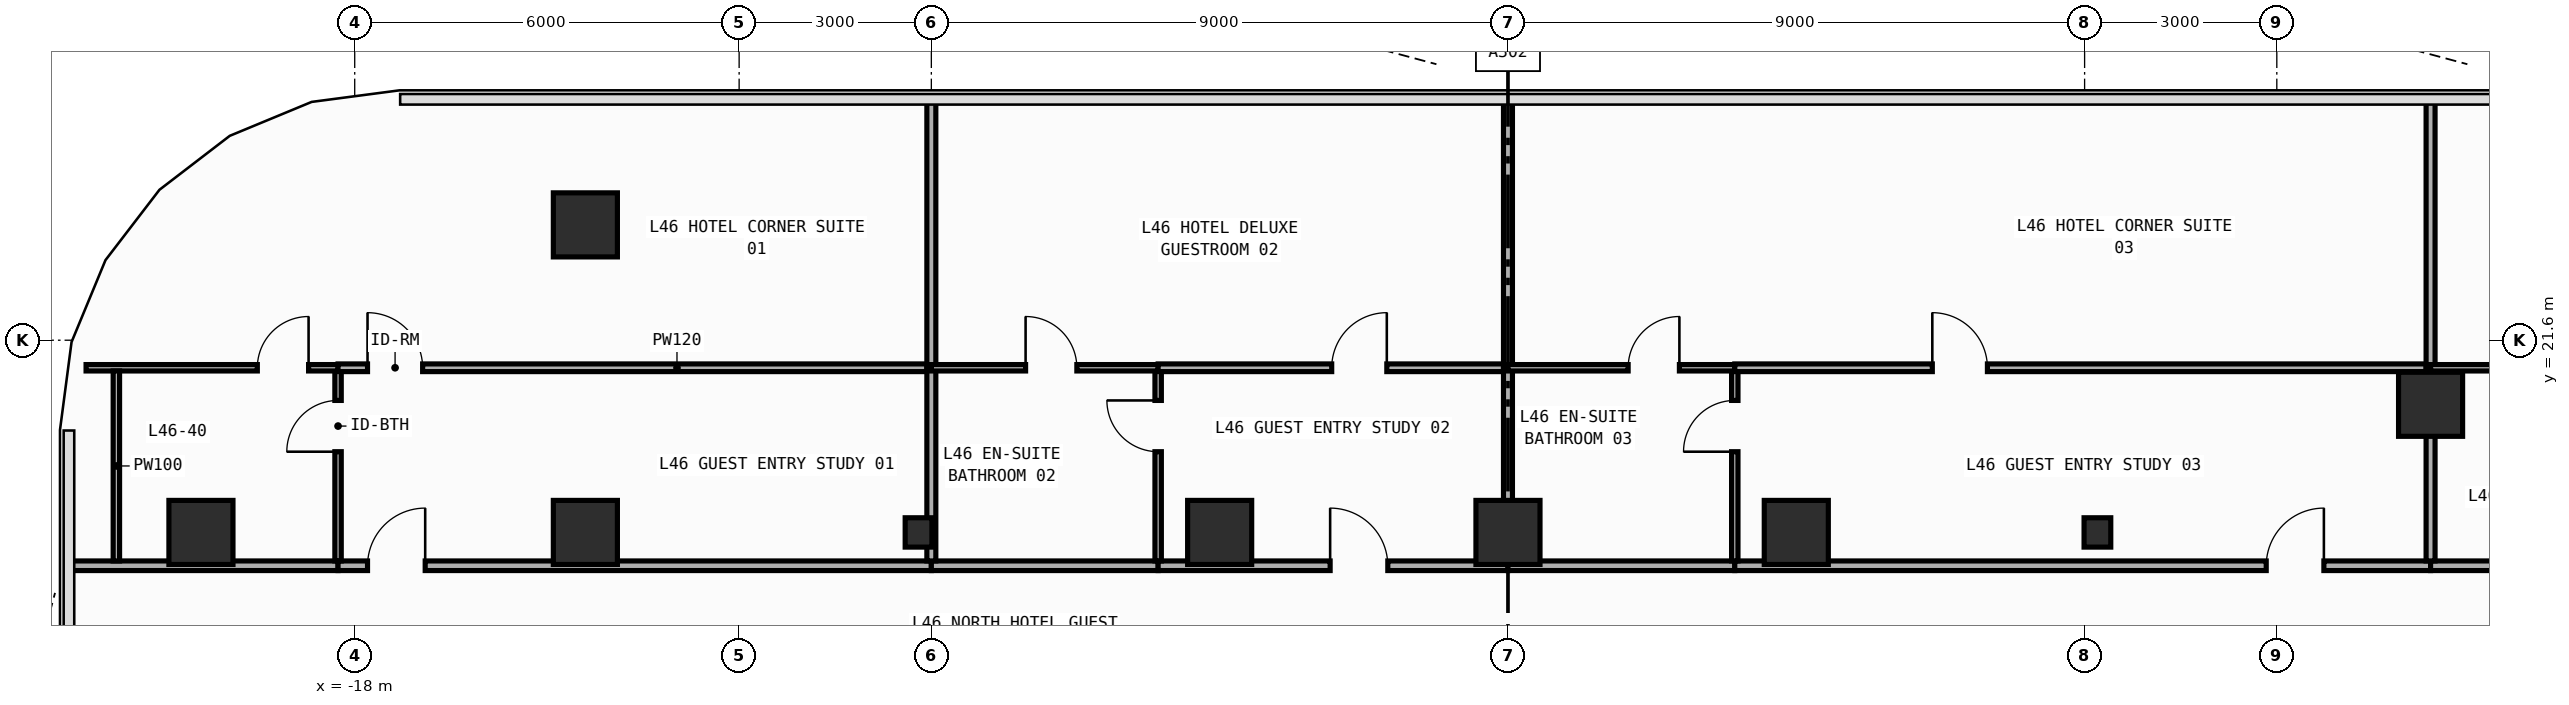
"""IFC4 building model, lengths in metres.
Left out: names, types, materials, properties, quantities, classifications, styles, units other than length and angle.
Written with IfcOpenShell. Run it as: python <this file> out.ifc"""

import sys

from ifc_helpers import new_model, si_unit, direction, frame, frame_2d, origin, origin_2d, place, context, subcontext, project, spatial, rectangle, i_section, extrude, element, fill, save


model = new_model("IFC4")
c1 = context("Model", 3, precision=1e-05, world=origin(), true_north=direction((0.0, 1.0)))
c2 = subcontext(c1, "Body", "Model", "MODEL_VIEW")
j1 = project(units=[si_unit("LENGTHUNIT", "METRE"), si_unit("PLANEANGLEUNIT", "RADIAN")], contexts=[c1])
p1 = place(None, origin())
s1 = spatial("IfcSite", under=j1, at=p1, CompositionType="ELEMENT")
p2 = place(p1, origin())
s2 = spatial("IfcBuilding", under=s1, at=p2, CompositionType="ELEMENT")
p3 = place(p2, frame((0.0, 0.0, 199.2)))
s3 = spatial("IfcBuildingStorey", under=s2, at=p3, CompositionType="ELEMENT", Elevation=199.2)
for number, where, z_axis, x_axis in (
    (1, (-9.2, 18.6, 0.0), (0.0, 0.0, 1.0), (1.0, 0.0, 0.0)),
    (2, (9.2, 18.6, 0.0), (0.0, 0.0, 1.0), (1.0, 0.0, 0.0)),
):
    element("IfcColumn", number, at=place(p3, frame(where, z_axis=z_axis, x_axis=x_axis)), inside=s3, PredefinedType="COLUMN", context=c2, shape_type="SweptSolid", body=[
        extrude(i_section(OverallWidth=0.417, OverallDepth=0.458, WebThickness=0.03, FlangeThickness=0.05, FilletRadius=0.022, at=origin_2d()), origin(), (0.0, 0.0, 1.0), 3.8),
    ])
for number, where, z_axis, x_axis in (
    (3, (-20.4, 18.6, 0.0), (0.0, 0.0, 1.0), (1.0, 0.0, 0.0)),
    (4, (-14.4, 18.6, 0.0), (0.0, 0.0, 1.0), (1.0, 0.0, 0.0)),
    (5, (-4.5, 18.6, 0.0), (0.0, 0.0, 1.0), (1.0, 0.0, 0.0)),
    (6, (0.0, 18.6, 0.0), (0.0, 0.0, 1.0), (1.0, 0.0, 0.0)),
    (7, (4.5, 18.6, 0.0), (0.0, 0.0, 1.0), (1.0, 0.0, 0.0)),
    (8, (-14.4, 23.4, 0.0), (0.0, 0.0, 1.0), (1.0, 0.0, 0.0)),
    (9, (14.4, 20.6, 0.0), (0.0, 0.0, 1.0), (1.0, 0.0, 0.0)),
):
    element("IfcColumn", number, at=place(p3, frame(where, z_axis=z_axis, x_axis=x_axis)), inside=s3, PredefinedType="COLUMN", context=c2, shape_type="SweptSolid", body=[
        extrude(rectangle(XDim=1.0, YDim=1.0, at=origin_2d()), origin(), (0.0, 0.0, 1.0), 3.8),
    ])
p4 = place(p3, frame((-22.455, 18.08, 0.0), z_axis=(0.0, 0.0, 1.0), x_axis=(1.0, 0.0, 0.0)))
e10 = element("IfcWall", 10, at=p4, inside=s3, PredefinedType="PARTITIONING", context=c2, shape_type="SweptSolid", body=[
    extrude(rectangle(XDim=4.195, YDim=0.15, at=frame_2d((2.098, 0.0))), origin(), (0.0, 0.0, 1.0), 3.54),
])
p5 = place(p3, frame((-18.26, 18.08, 0.0), z_axis=(0.0, 0.0, 1.0), x_axis=(1.0, 0.0, 0.0)))
e11 = element("IfcWall", 11, at=p5, inside=s3, PredefinedType="PARTITIONING", context=c2, shape_type="SweptSolid", body=[
    extrude(rectangle(XDim=9.26, YDim=0.15, at=frame_2d((4.63, 0.0))), origin(), (0.0, 0.0, 1.0), 3.54),
])
p6 = place(p5, frame((0.46, 0.0, 0.0)))
e12 = element("IfcOpeningElement", 12, at=p6, cuts=e11, PredefinedType="OPENING", context=c2, shape_type="SweptSolid", body=[
    extrude(rectangle(XDim=0.9, YDim=2.15, at=frame_2d((0.45, 1.075))), frame((0.0, 0.085, 0.0), z_axis=(0.0, -1.0, 0.0), x_axis=(1.0, 0.0, 0.0)), (0.0, 0.0, 1.0), 0.17),
])
p7 = place(p3, frame((-9.0, 18.08, 0.0), z_axis=(0.0, 0.0, 1.0), x_axis=(1.0, 0.0, 0.0)))
e13 = element("IfcWall", 13, at=p7, inside=s3, PredefinedType="PARTITIONING", context=c2, shape_type="SweptSolid", body=[
    extrude(rectangle(XDim=3.54, YDim=0.15, at=frame_2d((1.77, 0.0))), origin(), (0.0, 0.0, 1.0), 3.54),
])
p8 = place(p3, frame((-5.46, 18.08, 0.0), z_axis=(0.0, 0.0, 1.0), x_axis=(1.0, 0.0, 0.0)))
e14 = element("IfcWall", 14, at=p8, inside=s3, PredefinedType="PARTITIONING", context=c2, shape_type="SweptSolid", body=[
    extrude(rectangle(XDim=5.46, YDim=0.15, at=frame_2d((2.73, 0.0))), origin(), (0.0, 0.0, 1.0), 3.54),
])
p9 = place(p8, frame((2.684, 0.0, 0.0)))
e15 = element("IfcOpeningElement", 15, at=p9, cuts=e14, PredefinedType="OPENING", context=c2, shape_type="SweptSolid", body=[
    extrude(rectangle(XDim=0.9, YDim=2.15, at=frame_2d((0.45, 1.075))), frame((0.0, 0.085, 0.0), z_axis=(0.0, -1.0, 0.0), x_axis=(1.0, 0.0, 0.0)), (0.0, 0.0, 1.0), 0.17),
])
p10 = place(p3, frame((0.0, 18.08, 0.0), z_axis=(0.0, 0.0, 1.0), x_axis=(1.0, 0.0, 0.0)))
e16 = element("IfcWall", 16, at=p10, inside=s3, PredefinedType="PARTITIONING", context=c2, shape_type="SweptSolid", body=[
    extrude(rectangle(XDim=3.54, YDim=0.15, at=frame_2d((1.77, 0.0))), origin(), (0.0, 0.0, 1.0), 3.54),
])
p11 = place(p3, frame((3.54, 18.08, 0.0), z_axis=(0.0, 0.0, 1.0), x_axis=(1.0, 0.0, 0.0)))
e17 = element("IfcWall", 17, at=p11, inside=s3, PredefinedType="PARTITIONING", context=c2, shape_type="SweptSolid", body=[
    extrude(rectangle(XDim=10.86, YDim=0.15, at=frame_2d((5.43, 0.0))), origin(), (0.0, 0.0, 1.0), 3.54),
])
p12 = place(p11, frame((8.295, 0.0, 0.0)))
e18 = element("IfcOpeningElement", 18, at=p12, cuts=e17, PredefinedType="OPENING", context=c2, shape_type="SweptSolid", body=[
    extrude(rectangle(XDim=0.9, YDim=2.15, at=frame_2d((0.45, 1.075))), frame((0.0, 0.085, 0.0), z_axis=(0.0, -1.0, 0.0), x_axis=(1.0, 0.0, 0.0)), (0.0, 0.0, 1.0), 0.17),
])
p13 = place(p3, frame((14.4, 18.08, 0.0), z_axis=(0.0, 0.0, 1.0), x_axis=(1.0, 0.0, 0.0)))
e19 = element("IfcWall", 19, at=p13, inside=s3, PredefinedType="PARTITIONING", context=c2, shape_type="SweptSolid", body=[
    extrude(rectangle(XDim=3.036, YDim=0.15, at=frame_2d((1.518, 0.0))), origin(), (0.0, 0.0, 1.0), 3.54),
])
p14 = place(p3, frame((-18.26, 18.155, 0.0), z_axis=(0.0, 0.0, 1.0), x_axis=(0.0, 1.0, 0.0)))
e20 = element("IfcWall", 20, at=p14, inside=s3, PredefinedType="PARTITIONING", context=c2, shape_type="SweptSolid", body=[
    extrude(rectangle(XDim=2.965, YDim=0.1, at=frame_2d((1.482, 0.0))), origin(), (0.0, 0.0, 1.0), 3.54),
])
p15 = place(p14, frame((1.705, 0.0, 0.0)))
e21 = element("IfcOpeningElement", 21, at=p15, cuts=e20, PredefinedType="OPENING", context=c2, shape_type="SweptSolid", body=[
    extrude(rectangle(XDim=0.8, YDim=2.1, at=frame_2d((0.4, 1.05))), frame((0.0, 0.06, 0.0), z_axis=(0.0, -1.0, 0.0), x_axis=(1.0, 0.0, 0.0)), (0.0, 0.0, 1.0), 0.12),
])
p16 = place(p3, frame((-22.193, 21.17, 0.0), z_axis=(0.0, 0.0, 1.0), x_axis=(1.0, 0.0, 0.0)))
e22 = element("IfcWall", 22, at=p16, inside=s3, PredefinedType="PARTITIONING", context=c2, shape_type="SweptSolid", body=[
    extrude(rectangle(XDim=3.933, YDim=0.1, at=frame_2d((1.967, 0.0))), origin(), (0.0, 0.0, 1.0), 3.54),
])
p17 = place(p16, frame((2.673, 0.0, 0.0)))
e23 = element("IfcOpeningElement", 23, at=p17, cuts=e22, PredefinedType="OPENING", context=c2, shape_type="SweptSolid", body=[
    extrude(rectangle(XDim=0.8, YDim=2.1, at=frame_2d((0.4, 1.05))), frame((0.0, 0.06, 0.0), z_axis=(0.0, -1.0, 0.0), x_axis=(1.0, 0.0, 0.0)), (0.0, 0.0, 1.0), 0.12),
])
p18 = place(p3, frame((-18.26, 21.17, 0.0), z_axis=(0.0, 0.0, 1.0), x_axis=(1.0, 0.0, 0.0)))
e24 = element("IfcWall", 24, at=p18, inside=s3, PredefinedType="PARTITIONING", context=c2, shape_type="SweptSolid", body=[
    extrude(rectangle(XDim=9.26, YDim=0.12, at=frame_2d((4.63, 0.0))), origin(), (0.0, 0.0, 1.0), 3.54),
])
p19 = place(p18, frame((0.46, 0.0, 0.0)))
e25 = element("IfcOpeningElement", 25, at=p19, cuts=e24, PredefinedType="OPENING", context=c2, shape_type="SweptSolid", body=[
    extrude(rectangle(XDim=0.86, YDim=2.15, at=frame_2d((0.43, 1.075))), frame((0.0, 0.07, 0.0), z_axis=(0.0, -1.0, 0.0), x_axis=(1.0, 0.0, 0.0)), (0.0, 0.0, 1.0), 0.14),
])
p20 = place(p3, frame((-9.0, 18.155, 0.0), z_axis=(0.0, 0.0, 1.0), x_axis=(0.0, 1.0, 0.0)))
e26 = element("IfcWall", 26, at=p20, inside=s3, PredefinedType="PARTITIONING", context=c2, shape_type="SweptSolid", body=[
    extrude(rectangle(XDim=3.015, YDim=0.14, at=frame_2d((1.507, 0.0))), origin(), (0.0, 0.0, 1.0), 2.952),
])
p21 = place(p3, frame((-9.0, 21.17, 0.0), z_axis=(0.0, 0.0, 1.0), x_axis=(0.0, 1.0, 0.0)))
e27 = element("IfcWall", 27, at=p21, inside=s3, PredefinedType="PARTITIONING", context=c2, shape_type="SweptSolid", body=[
    extrude(rectangle(XDim=4.185, YDim=0.14, at=frame_2d((2.093, 0.0))), origin(), (0.0, 0.0, 1.0), 3.54),
])
p22 = place(p3, frame((-5.46, 18.155, 0.0), z_axis=(0.0, 0.0, 1.0), x_axis=(0.0, 1.0, 0.0)))
e28 = element("IfcWall", 28, at=p22, inside=s3, PredefinedType="PARTITIONING", context=c2, shape_type="SweptSolid", body=[
    extrude(rectangle(XDim=2.965, YDim=0.1, at=frame_2d((1.482, 0.0))), origin(), (0.0, 0.0, 1.0), 3.54),
])
p23 = place(p22, frame((1.705, 0.0, 0.0)))
e29 = element("IfcOpeningElement", 29, at=p23, cuts=e28, PredefinedType="OPENING", context=c2, shape_type="SweptSolid", body=[
    extrude(rectangle(XDim=0.8, YDim=2.1, at=frame_2d((0.4, 1.05))), frame((0.0, 0.06, 0.0), z_axis=(0.0, -1.0, 0.0), x_axis=(1.0, 0.0, 0.0)), (0.0, 0.0, 1.0), 0.12),
])
p24 = place(p3, frame((-9.0, 21.17, 0.0), z_axis=(0.0, 0.0, 1.0), x_axis=(1.0, 0.0, 0.0)))
e30 = element("IfcWall", 30, at=p24, inside=s3, PredefinedType="PARTITIONING", context=c2, shape_type="SweptSolid", body=[
    extrude(rectangle(XDim=3.54, YDim=0.1, at=frame_2d((1.77, 0.0))), origin(), (0.0, 0.0, 1.0), 3.54),
])
p25 = place(p24, frame((1.471, 0.0, 0.0)))
e31 = element("IfcOpeningElement", 31, at=p25, cuts=e30, PredefinedType="OPENING", context=c2, shape_type="SweptSolid", body=[
    extrude(rectangle(XDim=0.8, YDim=2.1, at=frame_2d((0.4, 1.05))), frame((0.0, 0.06, 0.0), z_axis=(0.0, -1.0, 0.0), x_axis=(1.0, 0.0, 0.0)), (0.0, 0.0, 1.0), 0.12),
])
p26 = place(p3, frame((-5.46, 21.17, 0.0), z_axis=(0.0, 0.0, 1.0), x_axis=(1.0, 0.0, 0.0)))
e32 = element("IfcWall", 32, at=p26, inside=s3, PredefinedType="PARTITIONING", context=c2, shape_type="SweptSolid", body=[
    extrude(rectangle(XDim=5.46, YDim=0.12, at=frame_2d((2.73, 0.0))), origin(), (0.0, 0.0, 1.0), 3.54),
])
p27 = place(p26, frame((2.709, 0.0, 0.0)))
e33 = element("IfcOpeningElement", 33, at=p27, cuts=e32, PredefinedType="OPENING", context=c2, shape_type="SweptSolid", body=[
    extrude(rectangle(XDim=0.86, YDim=2.15, at=frame_2d((0.43, 1.075))), frame((0.0, 0.07, 0.0), z_axis=(0.0, -1.0, 0.0), x_axis=(1.0, 0.0, 0.0)), (0.0, 0.0, 1.0), 0.14),
])
p28 = place(p3, frame((0.0, 18.155, 0.0), z_axis=(0.0, 0.0, 1.0), x_axis=(0.0, 1.0, 0.0)))
e34 = element("IfcWall", 34, at=p28, inside=s3, PredefinedType="PARTITIONING", context=c2, shape_type="SweptSolid", body=[
    extrude(rectangle(XDim=3.015, YDim=0.14, at=frame_2d((1.507, 0.0))), origin(), (0.0, 0.0, 1.0), 3.54),
])
p29 = place(p3, frame((0.0, 21.17, 0.0), z_axis=(0.0, 0.0, 1.0), x_axis=(0.0, 1.0, 0.0)))
e35 = element("IfcWall", 35, at=p29, inside=s3, PredefinedType="PARTITIONING", context=c2, shape_type="SweptSolid", body=[
    extrude(rectangle(XDim=4.185, YDim=0.14, at=frame_2d((2.093, 0.0))), origin(), (0.0, 0.0, 1.0), 3.54),
])
p30 = place(p3, frame((3.54, 18.155, 0.0), z_axis=(0.0, 0.0, 1.0), x_axis=(0.0, 1.0, 0.0)))
e36 = element("IfcWall", 36, at=p30, inside=s3, PredefinedType="PARTITIONING", context=c2, shape_type="SweptSolid", body=[
    extrude(rectangle(XDim=2.965, YDim=0.1, at=frame_2d((1.482, 0.0))), origin(), (0.0, 0.0, 1.0), 3.54),
])
p31 = place(p30, frame((1.705, 0.0, 0.0)))
e37 = element("IfcOpeningElement", 37, at=p31, cuts=e36, PredefinedType="OPENING", context=c2, shape_type="SweptSolid", body=[
    extrude(rectangle(XDim=0.8, YDim=2.1, at=frame_2d((0.4, 1.05))), frame((0.0, 0.06, 0.0), z_axis=(0.0, -1.0, 0.0), x_axis=(1.0, 0.0, 0.0)), (0.0, 0.0, 1.0), 0.12),
])
p32 = place(p3, frame((0.0, 21.17, 0.0), z_axis=(0.0, 0.0, 1.0), x_axis=(1.0, 0.0, 0.0)))
e38 = element("IfcWall", 38, at=p32, inside=s3, PredefinedType="PARTITIONING", context=c2, shape_type="SweptSolid", body=[
    extrude(rectangle(XDim=3.54, YDim=0.1, at=frame_2d((1.77, 0.0))), origin(), (0.0, 0.0, 1.0), 3.54),
])
p33 = place(p32, frame((1.875, 0.0, 0.0)))
e39 = element("IfcOpeningElement", 39, at=p33, cuts=e38, PredefinedType="OPENING", context=c2, shape_type="SweptSolid", body=[
    extrude(rectangle(XDim=0.8, YDim=2.1, at=frame_2d((0.4, 1.05))), frame((0.0, 0.06, 0.0), z_axis=(0.0, -1.0, 0.0), x_axis=(1.0, 0.0, 0.0)), (0.0, 0.0, 1.0), 0.12),
])
p34 = place(p3, frame((3.54, 21.17, 0.0), z_axis=(0.0, 0.0, 1.0), x_axis=(1.0, 0.0, 0.0)))
e40 = element("IfcWall", 40, at=p34, inside=s3, PredefinedType="PARTITIONING", context=c2, shape_type="SweptSolid", body=[
    extrude(rectangle(XDim=10.86, YDim=0.12, at=frame_2d((5.43, 0.0))), origin(), (0.0, 0.0, 1.0), 3.54),
])
p35 = place(p34, frame((3.083, 0.0, 0.0)))
e41 = element("IfcOpeningElement", 41, at=p35, cuts=e40, PredefinedType="OPENING", context=c2, shape_type="SweptSolid", body=[
    extrude(rectangle(XDim=0.86, YDim=2.15, at=frame_2d((0.43, 1.075))), frame((0.0, 0.07, 0.0), z_axis=(0.0, -1.0, 0.0), x_axis=(1.0, 0.0, 0.0)), (0.0, 0.0, 1.0), 0.14),
])
p36 = place(p3, frame((14.4, 18.155, 0.0), z_axis=(0.0, 0.0, 1.0), x_axis=(0.0, 1.0, 0.0)))
e42 = element("IfcWall", 42, at=p36, inside=s3, PredefinedType="PARTITIONING", context=c2, shape_type="SweptSolid", body=[
    extrude(rectangle(XDim=3.015, YDim=0.14, at=frame_2d((1.507, 0.0))), origin(), (0.0, 0.0, 1.0), 2.952),
])
p37 = place(p3, frame((14.4, 21.17, 0.0), z_axis=(0.0, 0.0, 1.0), x_axis=(0.0, 1.0, 0.0)))
e43 = element("IfcWall", 43, at=p37, inside=s3, PredefinedType="PARTITIONING", context=c2, shape_type="SweptSolid", body=[
    extrude(rectangle(XDim=4.185, YDim=0.14, at=frame_2d((2.093, 0.0))), origin(), (0.0, 0.0, 1.0), 3.54),
])
p38 = place(p3, frame((14.4, 21.17, 0.0), z_axis=(0.0, 0.0, 1.0), x_axis=(1.0, 0.0, 0.0)))
e44 = element("IfcWall", 44, at=p38, inside=s3, PredefinedType="PARTITIONING", context=c2, shape_type="SweptSolid", body=[
    extrude(rectangle(XDim=3.036, YDim=0.1, at=frame_2d((1.518, 0.0))), origin(), (0.0, 0.0, 1.0), 3.54),
])
p39 = place(p38, frame((1.776, 0.0, 0.0)))
e45 = element("IfcOpeningElement", 45, at=p39, cuts=e44, PredefinedType="OPENING", context=c2, shape_type="SweptSolid", body=[
    extrude(rectangle(XDim=0.8, YDim=2.1, at=frame_2d((0.4, 1.05))), frame((0.0, 0.06, 0.0), z_axis=(0.0, -1.0, 0.0), x_axis=(1.0, 0.0, 0.0)), (0.0, 0.0, 1.0), 0.12),
])
p40 = place(p3, frame((-21.72, 18.155, 0.0), z_axis=(0.0, 0.0, 1.0), x_axis=(0.0, 1.0, 0.0)))
e46 = element("IfcWall", 46, at=p40, inside=s3, PredefinedType="PARTITIONING", context=c2, shape_type="SweptSolid", body=[
    extrude(rectangle(XDim=2.965, YDim=0.1, at=frame_2d((1.482, 0.0))), origin(), (0.0, 0.0, 1.0), 3.54),
])
p41 = place(p6, origin())
e47 = element("IfcDoor", 47, at=p41, inside=s3, OperationType="SINGLE_SWING_RIGHT", PredefinedType="DOOR", context=c2, shape_type="SweptSolid", body=[
    extrude(rectangle(XDim=0.9, YDim=2.15, at=frame_2d((0.45, 1.075))), frame((0.0, 0.025, 0.0), z_axis=(0.0, -1.0, 0.0), x_axis=(1.0, 0.0, 0.0)), (0.0, 0.0, 1.0), 0.05),
])
fill(e12, e47)
p42 = place(p9, origin())
e48 = element("IfcDoor", 48, at=p42, inside=s3, OperationType="SINGLE_SWING_LEFT", PredefinedType="DOOR", context=c2, shape_type="SweptSolid", body=[
    extrude(rectangle(XDim=0.9, YDim=2.15, at=frame_2d((0.45, 1.075))), frame((0.0, 0.025, 0.0), z_axis=(0.0, -1.0, 0.0), x_axis=(1.0, 0.0, 0.0)), (0.0, 0.0, 1.0), 0.05),
])
fill(e15, e48)
p43 = place(p12, origin())
e49 = element("IfcDoor", 49, at=p43, inside=s3, OperationType="SINGLE_SWING_RIGHT", PredefinedType="DOOR", context=c2, shape_type="SweptSolid", body=[
    extrude(rectangle(XDim=0.9, YDim=2.15, at=frame_2d((0.45, 1.075))), frame((0.0, 0.025, 0.0), z_axis=(0.0, -1.0, 0.0), x_axis=(1.0, 0.0, 0.0)), (0.0, 0.0, 1.0), 0.05),
])
fill(e18, e49)
p44 = place(p15, origin())
e50 = element("IfcDoor", 50, at=p44, inside=s3, OperationType="SINGLE_SWING_LEFT", PredefinedType="DOOR", context=c2, shape_type="SweptSolid", body=[
    extrude(rectangle(XDim=0.8, YDim=2.1, at=frame_2d((0.4, 1.05))), frame((0.0, 0.025, 0.0), z_axis=(0.0, -1.0, 0.0), x_axis=(1.0, 0.0, 0.0)), (0.0, 0.0, 1.0), 0.05),
])
fill(e21, e50)
p45 = place(p17, origin())
e51 = element("IfcDoor", 51, at=p45, inside=s3, OperationType="SINGLE_SWING_RIGHT", PredefinedType="DOOR", context=c2, shape_type="SweptSolid", body=[
    extrude(rectangle(XDim=0.8, YDim=2.1, at=frame_2d((0.4, 1.05))), frame((0.0, 0.025, 0.0), z_axis=(0.0, -1.0, 0.0), x_axis=(1.0, 0.0, 0.0)), (0.0, 0.0, 1.0), 0.05),
])
fill(e23, e51)
p46 = place(p19, origin())
e52 = element("IfcDoor", 52, at=p46, inside=s3, OperationType="SINGLE_SWING_LEFT", PredefinedType="DOOR", context=c2, shape_type="SweptSolid", body=[
    extrude(rectangle(XDim=0.86, YDim=2.15, at=frame_2d((0.43, 1.075))), frame((0.0, 0.025, 0.0), z_axis=(0.0, -1.0, 0.0), x_axis=(1.0, 0.0, 0.0)), (0.0, 0.0, 1.0), 0.05),
])
fill(e25, e52)
p47 = place(p23, origin())
e53 = element("IfcDoor", 53, at=p47, inside=s3, OperationType="SINGLE_SWING_RIGHT", PredefinedType="DOOR", context=c2, shape_type="SweptSolid", body=[
    extrude(rectangle(XDim=0.8, YDim=2.1, at=frame_2d((0.4, 1.05))), frame((0.0, 0.025, 0.0), z_axis=(0.0, -1.0, 0.0), x_axis=(1.0, 0.0, 0.0)), (0.0, 0.0, 1.0), 0.05),
])
fill(e29, e53)
p48 = place(p25, origin())
e54 = element("IfcDoor", 54, at=p48, inside=s3, OperationType="SINGLE_SWING_LEFT", PredefinedType="DOOR", context=c2, shape_type="SweptSolid", body=[
    extrude(rectangle(XDim=0.8, YDim=2.1, at=frame_2d((0.4, 1.05))), frame((0.0, 0.025, 0.0), z_axis=(0.0, -1.0, 0.0), x_axis=(1.0, 0.0, 0.0)), (0.0, 0.0, 1.0), 0.05),
])
fill(e31, e54)
p49 = place(p27, origin())
e55 = element("IfcDoor", 55, at=p49, inside=s3, OperationType="SINGLE_SWING_RIGHT", PredefinedType="DOOR", context=c2, shape_type="SweptSolid", body=[
    extrude(rectangle(XDim=0.86, YDim=2.15, at=frame_2d((0.43, 1.075))), frame((0.0, 0.025, 0.0), z_axis=(0.0, -1.0, 0.0), x_axis=(1.0, 0.0, 0.0)), (0.0, 0.0, 1.0), 0.05),
])
fill(e33, e55)
p50 = place(p31, origin())
e56 = element("IfcDoor", 56, at=p50, inside=s3, OperationType="SINGLE_SWING_LEFT", PredefinedType="DOOR", context=c2, shape_type="SweptSolid", body=[
    extrude(rectangle(XDim=0.8, YDim=2.1, at=frame_2d((0.4, 1.05))), frame((0.0, 0.025, 0.0), z_axis=(0.0, -1.0, 0.0), x_axis=(1.0, 0.0, 0.0)), (0.0, 0.0, 1.0), 0.05),
])
fill(e37, e56)
p51 = place(p33, origin())
e57 = element("IfcDoor", 57, at=p51, inside=s3, OperationType="SINGLE_SWING_RIGHT", PredefinedType="DOOR", context=c2, shape_type="SweptSolid", body=[
    extrude(rectangle(XDim=0.8, YDim=2.1, at=frame_2d((0.4, 1.05))), frame((0.0, 0.025, 0.0), z_axis=(0.0, -1.0, 0.0), x_axis=(1.0, 0.0, 0.0)), (0.0, 0.0, 1.0), 0.05),
])
fill(e39, e57)
p52 = place(p35, origin())
e58 = element("IfcDoor", 58, at=p52, inside=s3, OperationType="SINGLE_SWING_LEFT", PredefinedType="DOOR", context=c2, shape_type="SweptSolid", body=[
    extrude(rectangle(XDim=0.86, YDim=2.15, at=frame_2d((0.43, 1.075))), frame((0.0, 0.025, 0.0), z_axis=(0.0, -1.0, 0.0), x_axis=(1.0, 0.0, 0.0)), (0.0, 0.0, 1.0), 0.05),
])
fill(e41, e58)
save(model, sys.argv[1])
